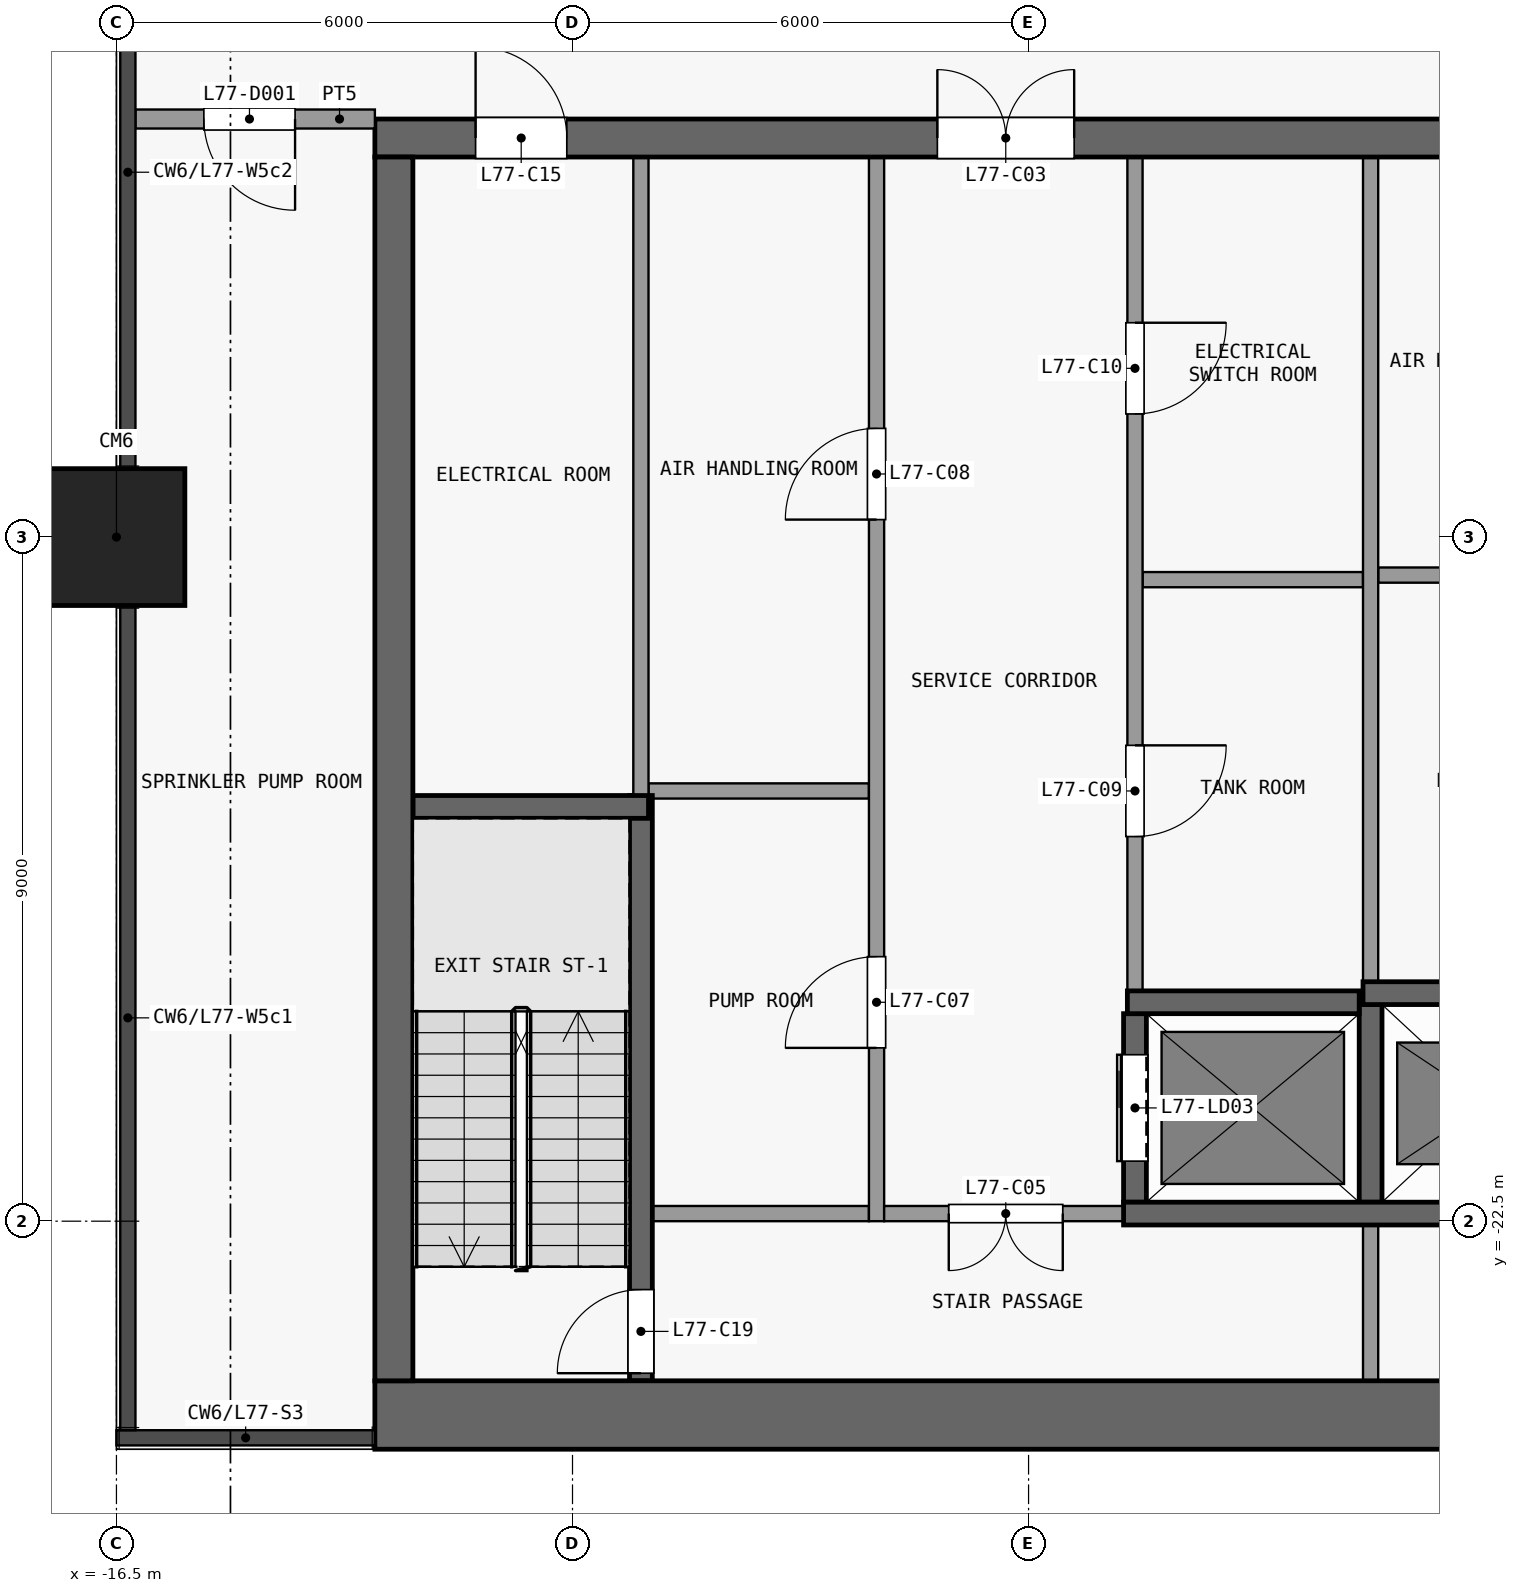
"""IFC4 building model, lengths in metres.
Left out: names, types, materials, properties, quantities, classifications, styles, units other than length and angle.
Written with IfcOpenShell. Run it as: python <this file> out.ifc"""

import sys

from ifc_helpers import new_model, si_unit, direction, frame, frame_2d, origin, origin_2d, place, context, subcontext, project, spatial, rectangle, extrude, element, fill, save


model = new_model("IFC4")
c1 = context("Model", 3, precision=1e-05, world=origin(), true_north=direction((0.0, 1.0)))
c2 = subcontext(c1, "Body", "Model", "MODEL_VIEW")
j1 = project(units=[si_unit("LENGTHUNIT", "METRE"), si_unit("PLANEANGLEUNIT", "RADIAN")], contexts=[c1])
p1 = place(None, origin())
s1 = spatial("IfcSite", under=j1, at=p1, CompositionType="ELEMENT")
p2 = place(p1, origin())
s2 = spatial("IfcBuilding", under=s1, at=p2, CompositionType="ELEMENT")
p3 = place(p2, frame((0.0, 0.0, 303.2)))
s3 = spatial("IfcBuildingStorey", under=s2, at=p3, CompositionType="ELEMENT", Elevation=303.2)
p4 = place(p3, frame((-16.5, -13.5, 0.0), z_axis=(0.0, 0.0, 1.0), x_axis=(1.0, 0.0, 0.0)))
e1 = element("IfcColumn", 1, at=p4, inside=s3, PredefinedType="COLUMN", context=c2, shape_type="SweptSolid", body=[
    extrude(rectangle(XDim=1.8, YDim=1.8, at=origin_2d()), origin(), (0.0, 0.0, 1.0), 4.5),
])
p5 = place(p3, frame((-13.1, -25.05, 0.0), z_axis=(0.0, 0.0, 1.0), x_axis=(1.0, 0.0, 0.0)))
e2 = element("IfcWall", 2, at=p5, inside=s3, PredefinedType="SHEAR", context=c2, shape_type="SweptSolid", body=[
    extrude(rectangle(XDim=26.2, YDim=0.9, at=frame_2d((13.1, 0.0))), origin(), (0.0, 0.0, 1.0), 4.2),
])
p6 = place(p3, frame((-13.1, -8.25, 0.0), z_axis=(0.0, 0.0, 1.0), x_axis=(1.0, 0.0, 0.0)))
e3 = element("IfcWall", 3, at=p6, inside=s3, PredefinedType="SHEAR", context=c2, shape_type="SweptSolid", body=[
    extrude(rectangle(XDim=26.2, YDim=0.5, at=frame_2d((13.1, 0.0))), origin(), (0.0, 0.0, 1.0), 4.2),
])
p7 = place(p6, frame((7.4, 0.0, 0.0)))
e4 = element("IfcOpeningElement", 4, at=p7, cuts=e3, PredefinedType="OPENING", context=c2, shape_type="SweptSolid", body=[
    extrude(rectangle(XDim=1.8, YDim=2.1, at=frame_2d((0.9, 1.05))), frame((0.0, 0.26, 0.0), z_axis=(0.0, -1.0, 0.0), x_axis=(1.0, 0.0, 0.0)), (0.0, 0.0, 1.0), 0.52),
])
p8 = place(p6, frame((17.0, 0.0, 0.0)))
e5 = element("IfcOpeningElement", 5, at=p8, cuts=e3, PredefinedType="OPENING", context=c2, shape_type="SweptSolid", body=[
    extrude(rectangle(XDim=1.8, YDim=2.1, at=frame_2d((0.9, 1.05))), frame((0.0, 0.26, 0.0), z_axis=(0.0, -1.0, 0.0), x_axis=(1.0, 0.0, 0.0)), (0.0, 0.0, 1.0), 0.52),
])
p9 = place(p6, frame((1.325, 0.0, 0.0)))
e6 = element("IfcOpeningElement", 6, at=p9, cuts=e3, PredefinedType="OPENING", context=c2, shape_type="SweptSolid", body=[
    extrude(rectangle(XDim=1.2, YDim=2.1, at=frame_2d((0.6, 1.05))), frame((0.0, 0.26, 0.0), z_axis=(0.0, -1.0, 0.0), x_axis=(1.0, 0.0, 0.0)), (0.0, 0.0, 1.0), 0.52),
])
p10 = place(p6, frame((22.975, 0.0, 0.0)))
e7 = element("IfcOpeningElement", 7, at=p10, cuts=e3, PredefinedType="OPENING", context=c2, shape_type="SweptSolid", body=[
    extrude(rectangle(XDim=0.9, YDim=2.1, at=frame_2d((0.45, 1.05))), frame((0.0, 0.26, 0.0), z_axis=(0.0, -1.0, 0.0), x_axis=(1.0, 0.0, 0.0)), (0.0, 0.0, 1.0), 0.52),
])
p11 = place(p3, frame((-12.85, -24.6, 0.0), z_axis=(0.0, 0.0, 1.0), x_axis=(0.0, 1.0, 0.0)))
e8 = element("IfcWall", 8, at=p11, inside=s3, PredefinedType="SHEAR", context=c2, shape_type="SweptSolid", body=[
    extrude(rectangle(XDim=16.1, YDim=0.5, at=frame_2d((8.05, 0.0))), origin(), (0.0, 0.0, 1.0), 4.2),
])
p12 = place(p3, frame((-9.45, -22.4, 0.0), z_axis=(0.0, 0.0, 1.0), x_axis=(1.0, 0.0, 0.0)))
e9 = element("IfcWall", 9, at=p12, inside=s3, PredefinedType="PARTITIONING", context=c2, shape_type="SweptSolid", body=[
    extrude(rectangle(XDim=2.85, YDim=0.2, at=frame_2d((1.425, 0.0))), origin(), (0.0, 0.0, 1.0), 4.2),
])
p13 = place(p3, frame((-3.25, -22.4, 0.0), z_axis=(0.0, 0.0, 1.0), x_axis=(-1.0, 0.0, 0.0)))
e10 = element("IfcWall", 10, at=p13, inside=s3, PredefinedType="PARTITIONING", context=c2, shape_type="SweptSolid", body=[
    extrude(rectangle(XDim=3.15, YDim=0.2, at=frame_2d((1.575, 0.0))), origin(), (0.0, 0.0, 1.0), 4.2),
])
p14 = place(p13, frame((0.8, 0.0, 0.0)))
e11 = element("IfcOpeningElement", 11, at=p14, cuts=e10, PredefinedType="OPENING", context=c2, shape_type="SweptSolid", body=[
    extrude(rectangle(XDim=1.5, YDim=2.1, at=frame_2d((0.75, 1.05))), frame((0.0, 0.11, 0.0), z_axis=(0.0, -1.0, 0.0), x_axis=(1.0, 0.0, 0.0)), (0.0, 0.0, 1.0), 0.22),
])
p15 = place(p3, frame((-3.25, -22.4, 0.0), z_axis=(0.0, 0.0, 1.0), x_axis=(1.0, 0.0, 0.0)))
e12 = element("IfcWall", 12, at=p15, inside=s3, PredefinedType="SHEAR", context=c2, shape_type="SweptSolid", body=[
    extrude(rectangle(XDim=6.5, YDim=0.3, at=frame_2d((3.25, 0.0))), origin(), (0.0, 0.0, 1.0), 4.2),
])
p16 = place(p3, frame((-3.2, -19.62, 0.0), z_axis=(0.0, 0.0, 1.0), x_axis=(1.0, 0.0, 0.0)))
e13 = element("IfcWall", 13, at=p16, inside=s3, PredefinedType="SHEAR", context=c2, shape_type="SweptSolid", body=[
    extrude(rectangle(XDim=3.05, YDim=0.3, at=frame_2d((1.525, 0.0))), origin(), (0.0, 0.0, 1.0), 4.2),
])
p17 = place(p3, frame((-0.1, -19.5, 0.0), z_axis=(0.0, 0.0, 1.0), x_axis=(1.0, 0.0, 0.0)))
e14 = element("IfcWall", 14, at=p17, inside=s3, PredefinedType="SHEAR", context=c2, shape_type="SweptSolid", body=[
    extrude(rectangle(XDim=3.3, YDim=0.3, at=frame_2d((1.65, 0.0))), origin(), (0.0, 0.0, 1.0), 4.2),
])
p18 = place(p3, frame((-12.6, -17.05, 0.0), z_axis=(0.0, 0.0, 1.0), x_axis=(1.0, 0.0, 0.0)))
e15 = element("IfcWall", 15, at=p18, inside=s3, PredefinedType="SHEAR", context=c2, shape_type="SweptSolid", body=[
    extrude(rectangle(XDim=3.1, YDim=0.3, at=frame_2d((1.55, 0.0))), origin(), (0.0, 0.0, 1.0), 4.2),
])
for number, where, z_axis, x_axis in (
    (16, (-9.5, -16.84, 0.0), (0.0, 0.0, 1.0), (1.0, 0.0, 0.0)),
    (17, (-3.0, -14.06, 0.0), (0.0, 0.0, 1.0), (1.0, 0.0, 0.0)),
    (18, (0.1, -14.0, 0.0), (0.0, 0.0, 1.0), (1.0, 0.0, 0.0)),
):
    element("IfcWall", number, at=place(p3, frame(where, z_axis=z_axis, x_axis=x_axis)), inside=s3, PredefinedType="PARTITIONING", context=c2, shape_type="SweptSolid", body=[
        extrude(rectangle(XDim=2.9, YDim=0.2, at=frame_2d((1.45, 0.0))), origin(), (0.0, 0.0, 1.0), 4.2),
    ])
p19 = place(p3, frame((-9.6, -24.6, 0.0), z_axis=(0.0, 0.0, 1.0), x_axis=(0.0, 1.0, 0.0)))
e19 = element("IfcWall", 19, at=p19, inside=s3, PredefinedType="SHEAR", context=c2, shape_type="SweptSolid", body=[
    extrude(rectangle(XDim=7.7, YDim=0.3, at=frame_2d((3.85, 0.0))), origin(), (0.0, 0.0, 1.0), 4.2),
])
p20 = place(p19, frame((0.1, 0.0, 0.0)))
e20 = element("IfcOpeningElement", 20, at=p20, cuts=e19, PredefinedType="OPENING", context=c2, shape_type="SweptSolid", body=[
    extrude(rectangle(XDim=1.1, YDim=2.1, at=frame_2d((0.55, 1.05))), frame((0.0, 0.16, 0.0), z_axis=(0.0, -1.0, 0.0), x_axis=(1.0, 0.0, 0.0)), (0.0, 0.0, 1.0), 0.32),
])
p21 = place(p3, frame((-9.6, -16.9, 0.0), z_axis=(0.0, 0.0, 1.0), x_axis=(0.0, 1.0, 0.0)))
e21 = element("IfcWall", 21, at=p21, inside=s3, PredefinedType="PARTITIONING", context=c2, shape_type="SweptSolid", body=[
    extrude(rectangle(XDim=8.4, YDim=0.2, at=frame_2d((4.2, 0.0))), origin(), (0.0, 0.0, 1.0), 4.2),
])
p22 = place(p3, frame((-6.5, -22.5, 0.0), z_axis=(0.0, 0.0, 1.0), x_axis=(0.0, 1.0, 0.0)))
e22 = element("IfcWall", 22, at=p22, inside=s3, PredefinedType="PARTITIONING", context=c2, shape_type="SweptSolid", body=[
    extrude(rectangle(XDim=14.0, YDim=0.2, at=frame_2d((7.0, 0.0))), origin(), (0.0, 0.0, 1.0), 4.2),
])
p23 = place(p22, frame((2.28, 0.0, 0.0)))
e23 = element("IfcOpeningElement", 23, at=p23, cuts=e22, PredefinedType="OPENING", context=c2, shape_type="SweptSolid", body=[
    extrude(rectangle(XDim=1.2, YDim=2.1, at=frame_2d((0.6, 1.05))), frame((0.0, 0.11, 0.0), z_axis=(0.0, -1.0, 0.0), x_axis=(1.0, 0.0, 0.0)), (0.0, 0.0, 1.0), 0.22),
])
p24 = place(p22, frame((9.23, 0.0, 0.0)))
e24 = element("IfcOpeningElement", 24, at=p24, cuts=e22, PredefinedType="OPENING", context=c2, shape_type="SweptSolid", body=[
    extrude(rectangle(XDim=1.2, YDim=2.1, at=frame_2d((0.6, 1.05))), frame((0.0, 0.11, 0.0), z_axis=(0.0, -1.0, 0.0), x_axis=(1.0, 0.0, 0.0)), (0.0, 0.0, 1.0), 0.22),
])
p25 = place(p3, frame((-3.1, -22.25, 0.0), z_axis=(0.0, 0.0, 1.0), x_axis=(0.0, 1.0, 0.0)))
e25 = element("IfcWall", 25, at=p25, inside=s3, PredefinedType="SHEAR", context=c2, shape_type="SweptSolid", body=[
    extrude(rectangle(XDim=2.48, YDim=0.3, at=frame_2d((1.24, 0.0))), origin(), (0.0, 0.0, 1.0), 4.2),
])
p26 = place(p25, frame((0.54, 0.0, 0.0)))
e26 = element("IfcOpeningElement", 26, at=p26, cuts=e25, PredefinedType="OPENING", context=c2, shape_type="SweptSolid", body=[
    extrude(rectangle(XDim=1.4, YDim=2.1, at=frame_2d((0.7, 1.05))), frame((0.0, 0.16, 0.0), z_axis=(0.0, -1.0, 0.0), x_axis=(1.0, 0.0, 0.0)), (0.0, 0.0, 1.0), 0.32),
])
p27 = place(p3, frame((-3.1, -8.5, 0.0), z_axis=(0.0, 0.0, 1.0), x_axis=(0.0, -1.0, 0.0)))
e27 = element("IfcWall", 27, at=p27, inside=s3, PredefinedType="PARTITIONING", context=c2, shape_type="SweptSolid", body=[
    extrude(rectangle(XDim=10.97, YDim=0.2, at=frame_2d((5.485, 0.0))), origin(), (0.0, 0.0, 1.0), 4.2),
])
p28 = place(p27, frame((7.74, 0.0, 0.0)))
e28 = element("IfcOpeningElement", 28, at=p28, cuts=e27, PredefinedType="OPENING", context=c2, shape_type="SweptSolid", body=[
    extrude(rectangle(XDim=1.2, YDim=2.1, at=frame_2d((0.6, 1.05))), frame((0.0, 0.11, 0.0), z_axis=(0.0, -1.0, 0.0), x_axis=(1.0, 0.0, 0.0)), (0.0, 0.0, 1.0), 0.22),
])
p29 = place(p27, frame((2.18, 0.0, 0.0)))
e29 = element("IfcOpeningElement", 29, at=p29, cuts=e27, PredefinedType="OPENING", context=c2, shape_type="SweptSolid", body=[
    extrude(rectangle(XDim=1.2, YDim=2.1, at=frame_2d((0.6, 1.05))), frame((0.0, 0.11, 0.0), z_axis=(0.0, -1.0, 0.0), x_axis=(1.0, 0.0, 0.0)), (0.0, 0.0, 1.0), 0.22),
])
p30 = place(p3, frame((0.0, -24.6, 0.0), z_axis=(0.0, 0.0, 1.0), x_axis=(0.0, 1.0, 0.0)))
e30 = element("IfcWall", 30, at=p30, inside=s3, PredefinedType="PARTITIONING", context=c2, shape_type="SweptSolid", body=[
    extrude(rectangle(XDim=2.05, YDim=0.2, at=frame_2d((1.025, 0.0))), origin(), (0.0, 0.0, 1.0), 4.2),
])
p31 = place(p3, frame((0.0, -22.25, 0.0), z_axis=(0.0, 0.0, 1.0), x_axis=(0.0, 1.0, 0.0)))
e31 = element("IfcWall", 31, at=p31, inside=s3, PredefinedType="SHEAR", context=c2, shape_type="SweptSolid", body=[
    extrude(rectangle(XDim=2.6, YDim=0.3, at=frame_2d((1.3, 0.0))), origin(), (0.0, 0.0, 1.0), 4.2),
])
p32 = place(p3, frame((0.0, -19.35, 0.0), z_axis=(0.0, 0.0, 1.0), x_axis=(0.0, 1.0, 0.0)))
e32 = element("IfcWall", 32, at=p32, inside=s3, PredefinedType="PARTITIONING", context=c2, shape_type="SweptSolid", body=[
    extrude(rectangle(XDim=10.85, YDim=0.2, at=frame_2d((5.425, 0.0))), origin(), (0.0, 0.0, 1.0), 4.2),
])
p33 = place(p3, frame((-16.25, -8.0, 0.0), z_axis=(0.0, 0.0, 1.0), x_axis=(1.0, 0.0, 0.0)))
e33 = element("IfcWall", 33, at=p33, inside=s3, PredefinedType="PARTITIONING", context=c2, shape_type="SweptSolid", body=[
    extrude(rectangle(XDim=3.15, YDim=0.25, at=frame_2d((1.575, 0.0))), origin(), (0.0, 0.0, 1.0), 4.2),
])
p34 = place(p33, frame((0.9, 0.0, 0.0)))
e34 = element("IfcOpeningElement", 34, at=p34, cuts=e33, PredefinedType="OPENING", context=c2, shape_type="SweptSolid", body=[
    extrude(rectangle(XDim=1.2, YDim=2.1, at=frame_2d((0.6, 1.05))), frame((0.0, 0.135, 0.0), z_axis=(0.0, -1.0, 0.0), x_axis=(1.0, 0.0, 0.0)), (0.0, 0.0, 1.0), 0.27),
])
p35 = place(p26, origin())
e35 = element("IfcDoor", 35, at=p35, inside=s3, OperationType="DOUBLE_DOOR_SLIDING", PredefinedType="DOOR", context=c2, shape_type="SweptSolid", body=[
    extrude(rectangle(XDim=1.4, YDim=2.1, at=frame_2d((0.7, 1.05))), frame((0.0, 0.025, 0.0), z_axis=(0.0, -1.0, 0.0), x_axis=(1.0, 0.0, 0.0)), (0.0, 0.0, 1.0), 0.05),
])
fill(e26, e35)
p36 = place(p7, origin())
e36 = element("IfcDoor", 36, at=p36, inside=s3, OperationType="DOUBLE_DOOR_SINGLE_SWING", PredefinedType="DOOR", context=c2, shape_type="SweptSolid", body=[
    extrude(rectangle(XDim=1.8, YDim=2.1, at=frame_2d((0.9, 1.05))), frame((0.0, 0.025, 0.0), z_axis=(0.0, -1.0, 0.0), x_axis=(1.0, 0.0, 0.0)), (0.0, 0.0, 1.0), 0.05),
])
fill(e4, e36)
p37 = place(p14, origin())
e37 = element("IfcDoor", 37, at=p37, inside=s3, OperationType="DOUBLE_DOOR_SINGLE_SWING", PredefinedType="DOOR", context=c2, shape_type="SweptSolid", body=[
    extrude(rectangle(XDim=1.5, YDim=2.1, at=frame_2d((0.75, 1.05))), frame((0.0, 0.025, 0.0), z_axis=(0.0, -1.0, 0.0), x_axis=(1.0, 0.0, 0.0)), (0.0, 0.0, 1.0), 0.05),
])
fill(e11, e37)
p38 = place(p23, origin())
e38 = element("IfcDoor", 38, at=p38, inside=s3, OperationType="SINGLE_SWING_LEFT", PredefinedType="DOOR", context=c2, shape_type="SweptSolid", body=[
    extrude(rectangle(XDim=1.2, YDim=2.1, at=frame_2d((0.6, 1.05))), frame((0.0, 0.025, 0.0), z_axis=(0.0, -1.0, 0.0), x_axis=(1.0, 0.0, 0.0)), (0.0, 0.0, 1.0), 0.05),
])
fill(e23, e38)
p39 = place(p24, origin())
e39 = element("IfcDoor", 39, at=p39, inside=s3, OperationType="SINGLE_SWING_LEFT", PredefinedType="DOOR", context=c2, shape_type="SweptSolid", body=[
    extrude(rectangle(XDim=1.2, YDim=2.1, at=frame_2d((0.6, 1.05))), frame((0.0, 0.025, 0.0), z_axis=(0.0, -1.0, 0.0), x_axis=(1.0, 0.0, 0.0)), (0.0, 0.0, 1.0), 0.05),
])
fill(e24, e39)
p40 = place(p28, origin())
e40 = element("IfcDoor", 40, at=p40, inside=s3, OperationType="SINGLE_SWING_LEFT", PredefinedType="DOOR", context=c2, shape_type="SweptSolid", body=[
    extrude(rectangle(XDim=1.2, YDim=2.1, at=frame_2d((0.6, 1.05))), frame((0.0, 0.025, 0.0), z_axis=(0.0, -1.0, 0.0), x_axis=(1.0, 0.0, 0.0)), (0.0, 0.0, 1.0), 0.05),
])
fill(e28, e40)
p41 = place(p29, origin())
e41 = element("IfcDoor", 41, at=p41, inside=s3, OperationType="SINGLE_SWING_LEFT", PredefinedType="DOOR", context=c2, shape_type="SweptSolid", body=[
    extrude(rectangle(XDim=1.2, YDim=2.1, at=frame_2d((0.6, 1.05))), frame((0.0, 0.025, 0.0), z_axis=(0.0, -1.0, 0.0), x_axis=(1.0, 0.0, 0.0)), (0.0, 0.0, 1.0), 0.05),
])
fill(e29, e41)
p42 = place(p9, origin())
e42 = element("IfcDoor", 42, at=p42, inside=s3, OperationType="SINGLE_SWING_LEFT", PredefinedType="DOOR", context=c2, shape_type="SweptSolid", body=[
    extrude(rectangle(XDim=1.2, YDim=2.1, at=frame_2d((0.6, 1.05))), frame((0.0, 0.025, 0.0), z_axis=(0.0, -1.0, 0.0), x_axis=(1.0, 0.0, 0.0)), (0.0, 0.0, 1.0), 0.05),
])
fill(e6, e42)
p43 = place(p20, origin())
e43 = element("IfcDoor", 43, at=p43, inside=s3, OperationType="SINGLE_SWING_LEFT", PredefinedType="DOOR", context=c2, shape_type="SweptSolid", body=[
    extrude(rectangle(XDim=1.1, YDim=2.1, at=frame_2d((0.55, 1.05))), frame((0.0, 0.025, 0.0), z_axis=(0.0, -1.0, 0.0), x_axis=(1.0, 0.0, 0.0)), (0.0, 0.0, 1.0), 0.05),
])
fill(e20, e43)
p44 = place(p34, origin())
e44 = element("IfcDoor", 44, at=p44, inside=s3, OperationType="SINGLE_SWING_RIGHT", PredefinedType="DOOR", context=c2, shape_type="SweptSolid", body=[
    extrude(rectangle(XDim=1.2, YDim=2.1, at=frame_2d((0.6, 1.05))), frame((0.0, 0.025, 0.0), z_axis=(0.0, -1.0, 0.0), x_axis=(1.0, 0.0, 0.0)), (0.0, 0.0, 1.0), 0.05),
])
fill(e34, e44)
save(model, sys.argv[1])
